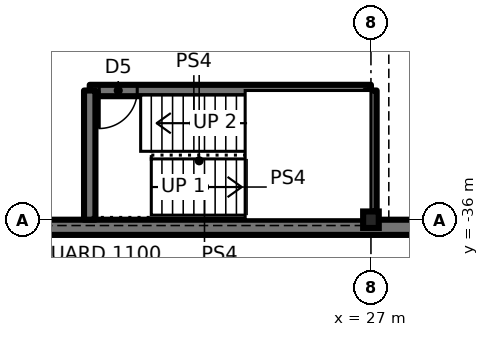
"""IFC4 building model, lengths in metres.
Left out: names, types, materials, properties, quantities, classifications, styles, units other than length and angle.
Written with IfcOpenShell. Run it as: python <this file> out.ifc"""

import sys

from ifc_helpers import new_model, si_unit, direction, frame, frame_2d, origin, origin_2d, place, context, subcontext, project, spatial, rectangle, i_section, extrude, element, fill, save


model = new_model("IFC4")
c1 = context("Model", 3, precision=1e-05, world=origin(), true_north=direction((0.0, 1.0)))
c2 = subcontext(c1, "Body", "Model", "MODEL_VIEW")
j1 = project(units=[si_unit("LENGTHUNIT", "METRE"), si_unit("PLANEANGLEUNIT", "RADIAN")], contexts=[c1])
p1 = place(None, origin())
s1 = spatial("IfcSite", under=j1, at=p1, CompositionType="ELEMENT")
p2 = place(p1, origin())
s2 = spatial("IfcBuilding", under=s1, at=p2, CompositionType="ELEMENT")
p3 = place(p2, frame((0.0, 0.0, -7.2)))
s3 = spatial("IfcBuildingStorey", under=s2, at=p3, CompositionType="ELEMENT", Elevation=-7.2)
p4 = place(p3, frame((27.0, -36.0, -0.25), z_axis=(0.0, 0.0, 1.0), x_axis=(1.0, 0.0, 0.0)))
e1 = element("IfcColumn", 1, at=p4, inside=s3, PredefinedType="COLUMN", context=c2, shape_type="SweptSolid", body=[
    extrude(i_section(OverallWidth=0.411, OverallDepth=0.434, WebThickness=0.036, FlangeThickness=0.057, at=origin_2d()), origin(), (0.0, 0.0, 1.0), 3.85),
])
p5 = place(p3, frame((-36.2, -36.2, 0.0), z_axis=(0.0, 0.0, 1.0), x_axis=(1.0, 0.0, 0.0)))
e2 = element("IfcWall", 2, at=p5, inside=s3, PredefinedType="SOLIDWALL", context=c2, shape_type="SweptSolid", body=[
    extrude(rectangle(XDim=126.4, YDim=0.4, at=frame_2d((63.2, 0.0))), origin(), (0.0, 0.0, 1.0), 3.6),
])
p6 = place(p3, frame((19.6, -32.6, -0.25), z_axis=(0.0, 0.0, 1.0), x_axis=(1.0, 0.0, 0.0)))
e3 = element("IfcWall", 3, at=p6, inside=s3, PredefinedType="SOLIDWALL", context=c2, shape_type="SweptSolid", body=[
    extrude(rectangle(XDim=7.4, YDim=0.3, at=frame_2d((3.7, 0.0))), origin(), (0.0, 0.0, 1.0), 3.85),
])
p7 = place(p6, frame((0.25, 0.0, 0.25)))
e4 = element("IfcOpeningElement", 4, at=p7, cuts=e3, PredefinedType="OPENING", context=c2, shape_type="SweptSolid", body=[
    extrude(rectangle(XDim=1.0, YDim=2.1, at=frame_2d((0.5, 1.05))), frame((0.0, 0.16, 0.0), z_axis=(0.0, -1.0, 0.0), x_axis=(1.0, 0.0, 0.0)), (0.0, 0.0, 1.0), 0.32),
])
p8 = place(p3, frame((27.0, -35.783, -0.25), z_axis=(0.0, 0.0, 1.0), x_axis=(0.0, 1.0, 0.0)))
e5 = element("IfcWall", 5, at=p8, inside=s3, PredefinedType="SOLIDWALL", context=c2, shape_type="SweptSolid", body=[
    extrude(rectangle(XDim=3.183, YDim=0.3, at=frame_2d((1.591, 0.0))), origin(), (0.0, 0.0, 1.0), 3.85),
])
p9 = place(p3, frame((19.6, -36.0, -0.25), z_axis=(0.0, 0.0, 1.0), x_axis=(0.0, 1.0, 0.0)))
e6 = element("IfcWall", 6, at=p9, inside=s3, PredefinedType="SOLIDWALL", context=c2, shape_type="SweptSolid", body=[
    extrude(rectangle(XDim=3.4, YDim=0.3, at=frame_2d((1.7, 0.0))), origin(), (0.0, 0.0, 1.0), 3.85),
])
p10 = place(p7, frame((1.0, 0.0, 0.0), z_axis=(0.0, 0.0, 1.0), x_axis=(-1.0, 0.0, 0.0)))
e7 = element("IfcDoor", 7, at=p10, inside=s3, OperationType="SINGLE_SWING_RIGHT", PredefinedType="DOOR", context=c2, shape_type="SweptSolid", body=[
    extrude(rectangle(XDim=1.0, YDim=2.1, at=frame_2d((0.5, 1.05))), frame((0.0, 0.025, 0.0), z_axis=(0.0, -1.0, 0.0), x_axis=(1.0, 0.0, 0.0)), (0.0, 0.0, 1.0), 0.05),
])
fill(e4, e7)
save(model, sys.argv[1])
